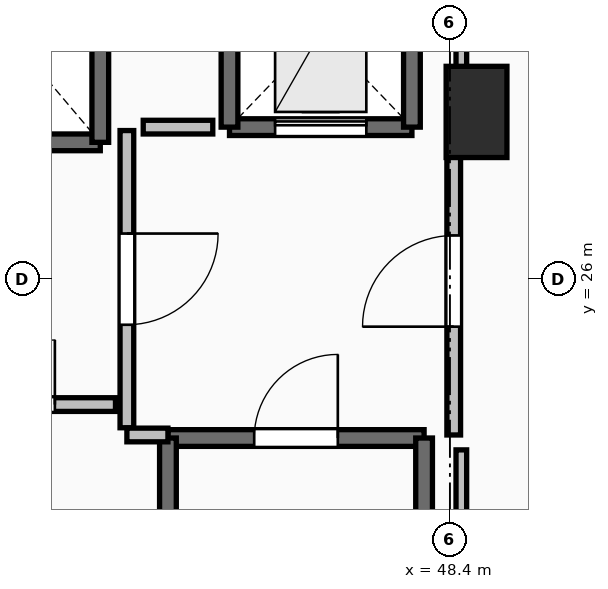
"""IFC4 building model, lengths in metres.
Left out: names, types, materials, properties, quantities, classifications, styles, units other than length and angle.
Written with IfcOpenShell. Run it as: python <this file> out.ifc"""

import sys

from ifc_helpers import new_model, si_unit, direction, frame, frame_2d, origin, origin_2d, place, context, subcontext, project, spatial, rectangle, extrude, element, fill, save


model = new_model("IFC4")
c1 = context("Model", 3, precision=1e-05, world=origin(), true_north=direction((0.0, 1.0)))
c2 = subcontext(c1, "Body", "Model", "MODEL_VIEW")
j1 = project(units=[si_unit("LENGTHUNIT", "METRE"), si_unit("PLANEANGLEUNIT", "RADIAN")], contexts=[c1])
p1 = place(None, origin())
s1 = spatial("IfcSite", under=j1, at=p1, CompositionType="ELEMENT")
p2 = place(p1, origin())
s2 = spatial("IfcBuilding", under=s1, at=p2, CompositionType="ELEMENT")
p3 = place(p2, frame((0.0, 0.0, 24.0)))
s3 = spatial("IfcBuildingStorey", under=s2, at=p3, CompositionType="ELEMENT", Elevation=24.0)
p4 = place(p3, frame((48.75, 28.2, 0.0), z_axis=(0.0, 0.0, 1.0), x_axis=(1.0, 0.0, 0.0)))
e1 = element("IfcColumn", 1, at=p4, inside=s3, PredefinedType="PILASTER", context=c2, shape_type="SweptSolid", body=[
    extrude(rectangle(XDim=0.8, YDim=1.2, at=origin_2d()), origin(), (0.0, 0.0, 1.0), 3.5),
])
p5 = place(p3, frame((44.69, 23.91, 0.0), z_axis=(0.0, 0.0, 1.0), x_axis=(1.0, 0.0, 0.0)))
e2 = element("IfcWall", 2, at=p5, inside=s3, PredefinedType="SOLIDWALL", context=c2, shape_type="SweptSolid", body=[
    extrude(rectangle(XDim=3.37, YDim=0.22, at=frame_2d((1.685, 0.0))), origin(), (0.0, 0.0, 1.0), 3.24),
])
p6 = place(p5, frame((1.135, 0.0, 0.0)))
e3 = element("IfcOpeningElement", 3, at=p6, cuts=e2, PredefinedType="OPENING", context=c2, shape_type="SweptSolid", body=[
    extrude(rectangle(XDim=1.1, YDim=2.15, at=frame_2d((0.55, 1.075))), frame((0.0, 0.125, 0.0), z_axis=(0.0, -1.0, 0.0), x_axis=(1.0, 0.0, 0.0)), (0.0, 0.0, 1.0), 0.25),
])
for number, where, z_axis, x_axis in (
    (4, (48.06, 23.91, 0.0), (0.0, 0.0, 1.0), (0.0, -1.0, 0.0)),
    (5, (44.69, 16.49, 0.0), (0.0, 0.0, 1.0), (0.0, 1.0, 0.0)),
):
    element("IfcWall", number, at=place(p3, frame(where, z_axis=z_axis, x_axis=x_axis)), inside=s3, PredefinedType="SOLIDWALL", context=c2, shape_type="SweptSolid", body=[
        extrude(rectangle(XDim=7.42, YDim=0.22, at=frame_2d((3.71, 0.0))), origin(), (0.0, 0.0, 1.0), 3.24),
    ])
p7 = place(p3, frame((41.6, 27.8, 0.0), z_axis=(0.0, 0.0, 1.0), x_axis=(1.0, 0.0, 0.0)))
e6 = element("IfcWall", 6, at=p7, inside=s3, PredefinedType="SOLIDWALL", context=c2, shape_type="SweptSolid", body=[
    extrude(rectangle(XDim=2.2, YDim=0.22, at=frame_2d((1.1, 0.0))), origin(), (0.0, 0.0, 1.0), 3.24),
])
p8 = place(p3, frame((43.8, 27.8, 0.0), z_axis=(0.0, 0.0, 1.0), x_axis=(0.0, 1.0, 0.0)))
e7 = element("IfcWall", 7, at=p8, inside=s3, PredefinedType="SOLIDWALL", context=c2, shape_type="SweptSolid", body=[
    extrude(rectangle(XDim=2.6, YDim=0.22, at=frame_2d((1.3, 0.0))), origin(), (0.0, 0.0, 1.0), 3.24),
])
p9 = place(p3, frame((45.5, 28.0, 0.0), z_axis=(0.0, 0.0, 1.0), x_axis=(1.0, 0.0, 0.0)))
e8 = element("IfcWall", 8, at=p9, inside=s3, PredefinedType="SHEAR", context=c2, shape_type="SweptSolid", body=[
    extrude(rectangle(XDim=2.4, YDim=0.22, at=frame_2d((1.2, 0.0))), origin(), (0.0, 0.0, 1.0), 3.24),
])
p10 = place(p9, frame((0.6, 0.0, 0.0)))
e9 = element("IfcOpeningElement", 9, at=p10, cuts=e8, PredefinedType="OPENING", context=c2, shape_type="SweptSolid", body=[
    extrude(rectangle(XDim=1.2, YDim=2.2, at=frame_2d((0.6, 1.1))), frame((0.0, 0.125, 0.0), z_axis=(0.0, -1.0, 0.0), x_axis=(1.0, 0.0, 0.0)), (0.0, 0.0, 1.0), 0.25),
])
for number, where, z_axis, x_axis in (
    (10, (47.9, 28.0, 0.0), (0.0, 0.0, 1.0), (0.0, 1.0, 0.0)),
    (11, (45.5, 30.5, 0.0), (0.0, 0.0, 1.0), (0.0, -1.0, 0.0)),
):
    element("IfcWall", number, at=place(p3, frame(where, z_axis=z_axis, x_axis=x_axis)), inside=s3, PredefinedType="SHEAR", context=c2, shape_type="SweptSolid", body=[
        extrude(rectangle(XDim=2.5, YDim=0.22, at=frame_2d((1.25, 0.0))), origin(), (0.0, 0.0, 1.0), 3.24),
    ])
p11 = place(p3, frame((44.15, 27.955, 0.0), z_axis=(0.0, 0.0, 1.0), x_axis=(0.0, -1.0, 0.0)))
e12 = element("IfcWall", 12, at=p11, inside=s3, PredefinedType="PARTITIONING", context=c2, shape_type="SweptSolid", body=[
    extrude(rectangle(XDim=3.91, YDim=0.18, at=frame_2d((1.955, 0.0))), origin(), (0.0, 0.0, 1.0), 3.24),
])
p12 = place(p11, frame((1.355, 0.0, 0.0)))
e13 = element("IfcOpeningElement", 13, at=p12, cuts=e12, PredefinedType="OPENING", context=c2, shape_type="SweptSolid", body=[
    extrude(rectangle(XDim=1.2, YDim=2.15, at=frame_2d((0.6, 1.075))), frame((0.0, 0.105, 0.0), z_axis=(0.0, -1.0, 0.0), x_axis=(1.0, 0.0, 0.0)), (0.0, 0.0, 1.0), 0.21),
])
p13 = place(p3, frame((44.15, 23.95, 0.0), z_axis=(0.0, 0.0, 1.0), x_axis=(1.0, 0.0, 0.0)))
e14 = element("IfcWall", 14, at=p13, inside=s3, PredefinedType="PARTITIONING", context=c2, shape_type="SweptSolid", body=[
    extrude(rectangle(XDim=0.54, YDim=0.18, at=frame_2d((0.27, 0.0))), origin(), (0.0, 0.0, 1.0), 3.24),
])
p14 = place(p3, frame((48.45, 23.95, 0.0), z_axis=(0.0, 0.0, 1.0), x_axis=(0.0, 1.0, 0.0)))
e15 = element("IfcWall", 15, at=p14, inside=s3, PredefinedType="PARTITIONING", context=c2, shape_type="SweptSolid", body=[
    extrude(rectangle(XDim=4.05, YDim=0.18, at=frame_2d((2.025, 0.0))), origin(), (0.0, 0.0, 1.0), 3.24),
])
p15 = place(p14, frame((1.425, 0.0, 0.0)))
e16 = element("IfcOpeningElement", 16, at=p15, cuts=e15, PredefinedType="OPENING", context=c2, shape_type="SweptSolid", body=[
    extrude(rectangle(XDim=1.2, YDim=2.15, at=frame_2d((0.6, 1.075))), frame((0.0, 0.105, 0.0), z_axis=(0.0, -1.0, 0.0), x_axis=(1.0, 0.0, 0.0)), (0.0, 0.0, 1.0), 0.21),
])
p16 = place(p3, frame((41.555, 24.35, 0.0), z_axis=(0.0, 0.0, 1.0), x_axis=(1.0, 0.0, 0.0)))
e17 = element("IfcWall", 17, at=p16, inside=s3, PredefinedType="PARTITIONING", context=c2, shape_type="SweptSolid", body=[
    extrude(rectangle(XDim=2.445, YDim=0.18, at=frame_2d((1.223, 0.0))), origin(), (0.0, 0.0, 1.0), 3.24),
])
p17 = place(p16, frame((0.798, 0.0, 0.0)))
e18 = element("IfcOpeningElement", 18, at=p17, cuts=e17, PredefinedType="OPENING", context=c2, shape_type="SweptSolid", body=[
    extrude(rectangle(XDim=0.85, YDim=2.1, at=frame_2d((0.425, 1.05))), frame((0.0, 0.105, 0.0), z_axis=(0.0, -1.0, 0.0), x_axis=(1.0, 0.0, 0.0)), (0.0, 0.0, 1.0), 0.21),
])
p18 = place(p3, frame((45.28, 28.0, 0.0), z_axis=(0.0, 0.0, 1.0), x_axis=(-1.0, 0.0, 0.0)))
e19 = element("IfcWall", 19, at=p18, inside=s3, PredefinedType="PARTITIONING", context=c2, shape_type="SweptSolid", body=[
    extrude(rectangle(XDim=0.915, YDim=0.18, at=frame_2d((0.458, 0.0))), origin(), (0.0, 0.0, 1.0), 3.24),
])
p19 = place(p3, frame((48.55, 33.45, 0.0), z_axis=(0.0, 0.0, 1.0), x_axis=(0.0, -1.0, 0.0)))
e20 = element("IfcWall", 20, at=p19, inside=s3, PredefinedType="PARTITIONING", context=c2, shape_type="SweptSolid", body=[
    extrude(rectangle(XDim=5.254, YDim=0.14, at=frame_2d((2.627, 0.0))), origin(), (0.0, 0.0, 1.0), 2.432),
])
p20 = place(p3, frame((48.55, 23.754, 0.0), z_axis=(0.0, 0.0, 1.0), x_axis=(0.0, -1.0, 0.0)))
e21 = element("IfcWall", 21, at=p20, inside=s3, PredefinedType="PARTITIONING", context=c2, shape_type="SweptSolid", body=[
    extrude(rectangle(XDim=7.514, YDim=0.14, at=frame_2d((3.757, 0.0))), origin(), (0.0, 0.0, 1.0), 2.432),
])
p21 = place(p6, origin())
e22 = element("IfcDoor", 22, at=p21, inside=s3, OperationType="SINGLE_SWING_RIGHT", PredefinedType="DOOR", context=c2, shape_type="SweptSolid", body=[
    extrude(rectangle(XDim=1.1, YDim=2.15, at=frame_2d((0.55, 1.075))), frame((0.0, 0.025, 0.0), z_axis=(0.0, -1.0, 0.0), x_axis=(1.0, 0.0, 0.0)), (0.0, 0.0, 1.0), 0.05),
])
fill(e3, e22)
p22 = place(p10, origin())
e23 = element("IfcDoor", 23, at=p22, inside=s3, OperationType="SLIDING_TO_LEFT", PredefinedType="DOOR", context=c2, shape_type="SweptSolid", body=[
    extrude(rectangle(XDim=1.2, YDim=2.2, at=frame_2d((0.6, 1.1))), frame((0.0, 0.025, 0.0), z_axis=(0.0, -1.0, 0.0), x_axis=(1.0, 0.0, 0.0)), (0.0, 0.0, 1.0), 0.05),
])
fill(e9, e23)
p23 = place(p12, origin())
e24 = element("IfcDoor", 24, at=p23, inside=s3, OperationType="SINGLE_SWING_LEFT", PredefinedType="DOOR", context=c2, shape_type="SweptSolid", body=[
    extrude(rectangle(XDim=1.2, YDim=2.15, at=frame_2d((0.6, 1.075))), frame((0.0, 0.025, 0.0), z_axis=(0.0, -1.0, 0.0), x_axis=(1.0, 0.0, 0.0)), (0.0, 0.0, 1.0), 0.05),
])
fill(e13, e24)
p24 = place(p15, origin())
e25 = element("IfcDoor", 25, at=p24, inside=s3, OperationType="SINGLE_SWING_LEFT", PredefinedType="DOOR", context=c2, shape_type="SweptSolid", body=[
    extrude(rectangle(XDim=1.2, YDim=2.15, at=frame_2d((0.6, 1.075))), frame((0.0, 0.025, 0.0), z_axis=(0.0, -1.0, 0.0), x_axis=(1.0, 0.0, 0.0)), (0.0, 0.0, 1.0), 0.05),
])
fill(e16, e25)
p25 = place(p17, origin())
e26 = element("IfcDoor", 26, at=p25, inside=s3, OperationType="SINGLE_SWING_RIGHT", PredefinedType="DOOR", context=c2, shape_type="SweptSolid", body=[
    extrude(rectangle(XDim=0.85, YDim=2.1, at=frame_2d((0.425, 1.05))), frame((0.0, 0.025, 0.0), z_axis=(0.0, -1.0, 0.0), x_axis=(1.0, 0.0, 0.0)), (0.0, 0.0, 1.0), 0.05),
])
fill(e18, e26)
save(model, sys.argv[1])
